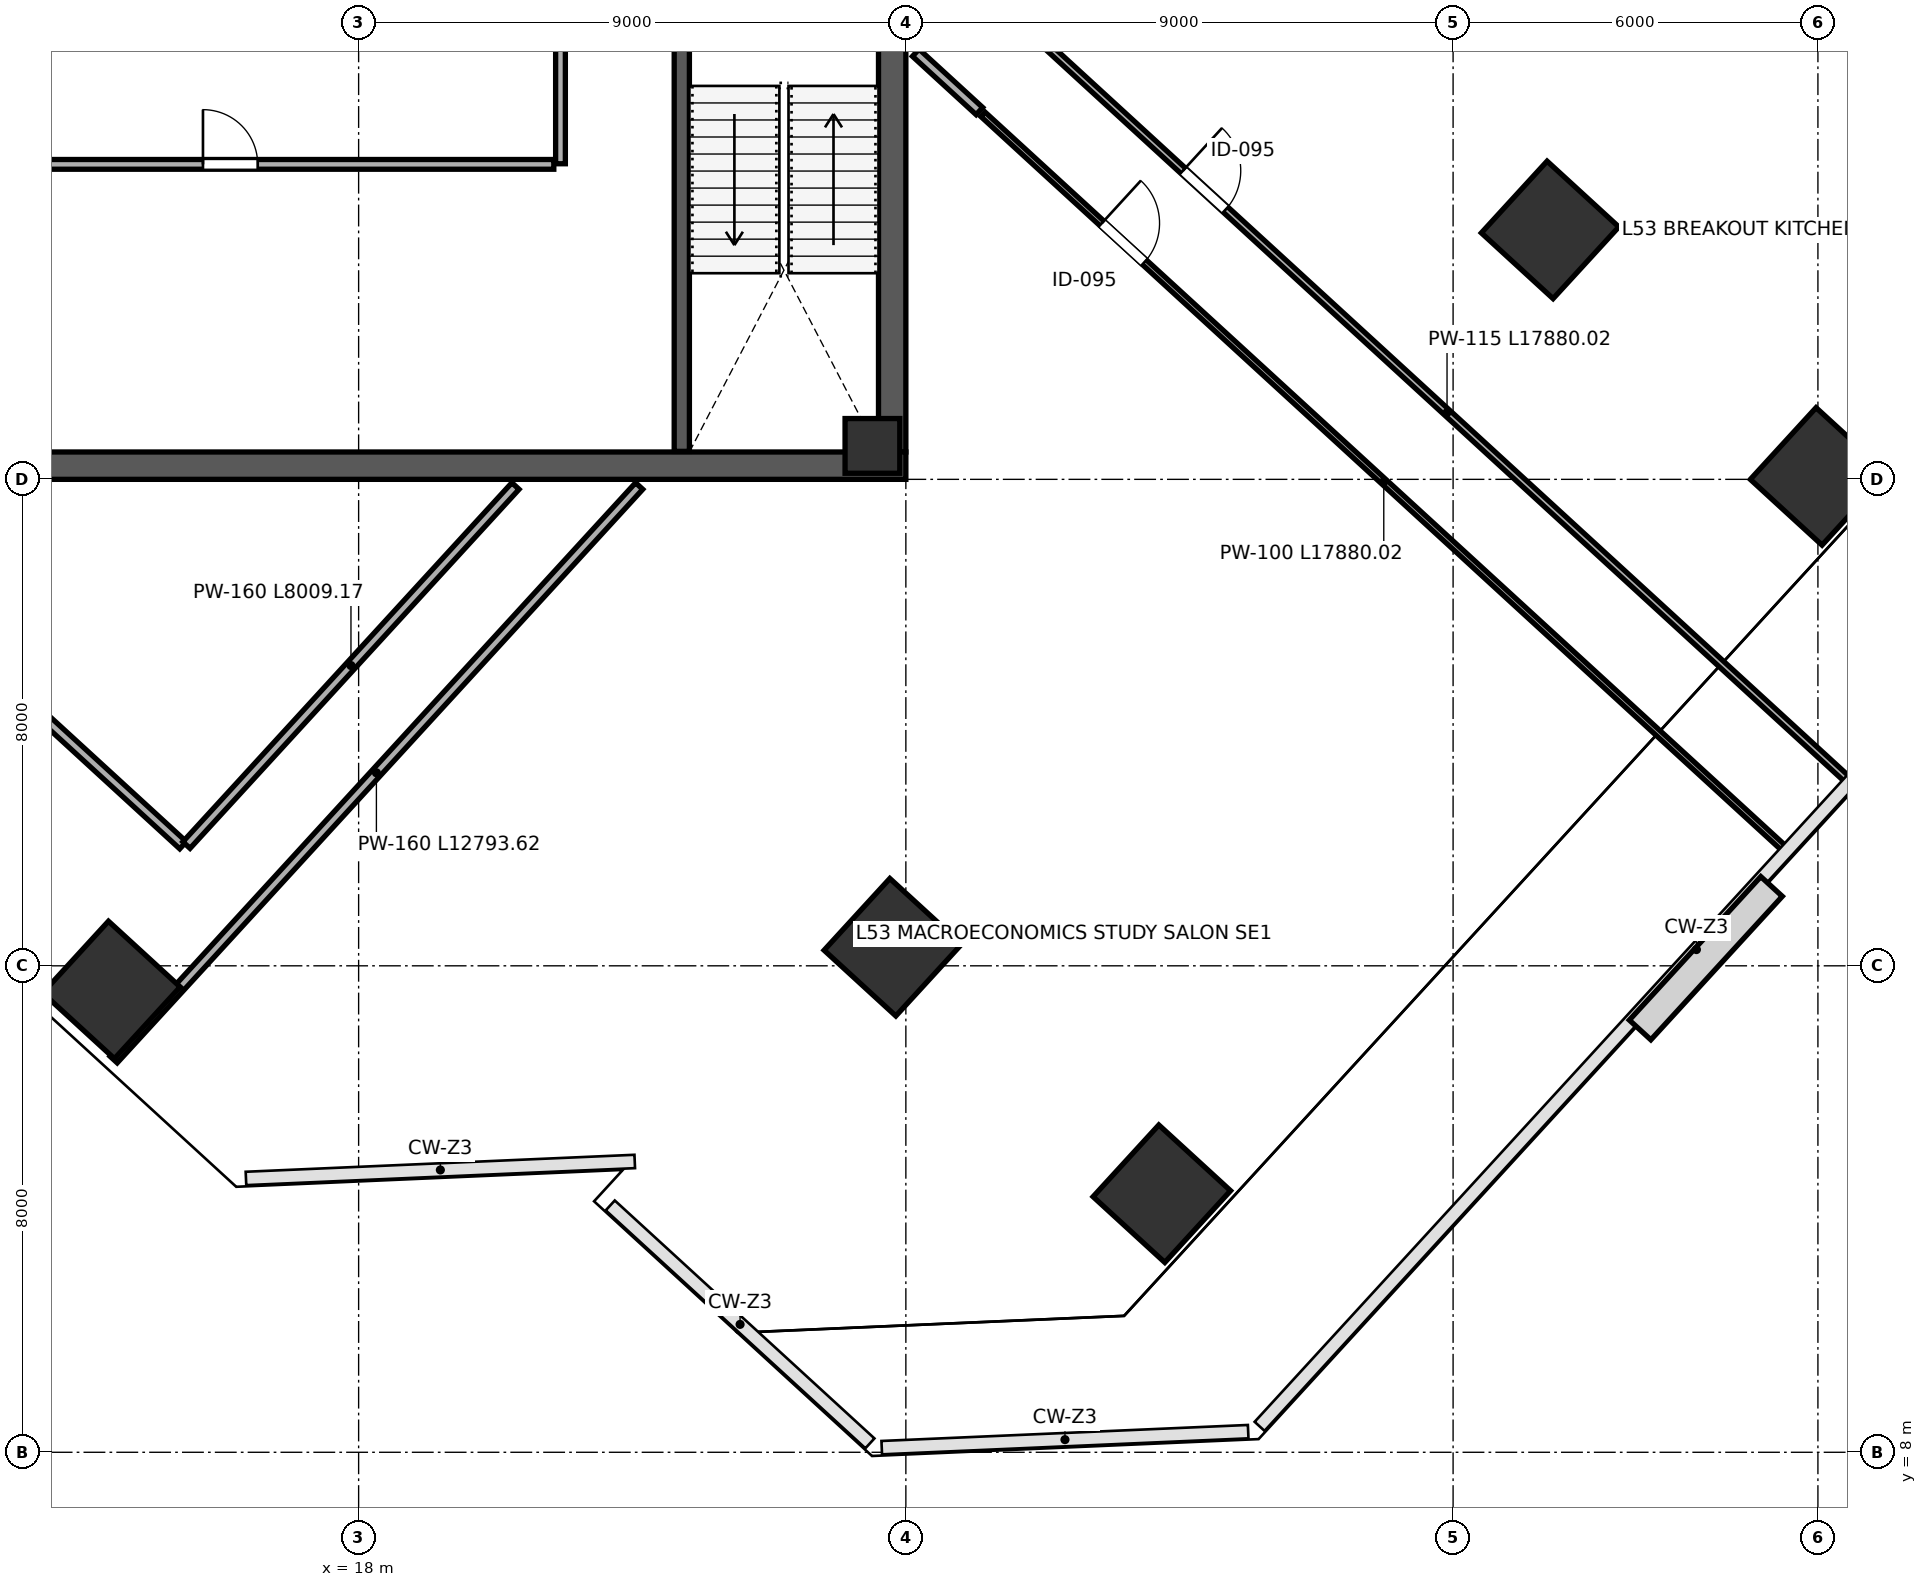
"""IFC4 building model, lengths in metres.
Left out: names, types, materials, properties, quantities, classifications, styles, units other than length and angle.
Written with IfcOpenShell. Run it as: python <this file> out.ifc"""

import sys

from ifc_helpers import new_model, si_unit, direction, frame, frame_2d, origin, origin_2d, place, context, subcontext, project, spatial, rectangle, extrude, source, transform, mapped, element, fill, save


model = new_model("IFC4")
c1 = context("Model", 3, precision=1e-05, world=origin(), true_north=direction((0.0, 1.0)))
c2 = subcontext(c1, "Body", "Model", "MODEL_VIEW")
j1 = project(units=[si_unit("LENGTHUNIT", "METRE"), si_unit("PLANEANGLEUNIT", "RADIAN")], contexts=[c1])
p1 = place(None, origin())
s1 = spatial("IfcSite", under=j1, at=p1, CompositionType="ELEMENT")
p2 = place(p1, origin())
s2 = spatial("IfcBuilding", under=s1, at=p2, CompositionType="ELEMENT")
p3 = place(p2, frame((0.0, 0.0, 237.4)))
s3 = spatial("IfcBuildingStorey", under=s2, at=p3, CompositionType="ELEMENT", Elevation=237.4)
m1 = source(origin(), c2, "Body", "SweptSolid", [
    extrude(rectangle(XDim=0.9, YDim=0.9, at=origin_2d()), origin(), (0.0, 0.0, 1.0), 4.199),
])
p4 = place(p3, frame((26.45, 24.55, 0.001), z_axis=(0.0, 0.0, 1.0), x_axis=(1.0, 0.0, 0.0)))
e1 = element("IfcColumn", 1, at=p4, inside=s3, PredefinedType="COLUMN", context=c2, shape_type="MappedRepresentation", body=[
    mapped(m1, transform((0.0, 0.0, 0.0), scale=1.0)),
])
m2 = source(origin(), c2, "Body", "SweptSolid", [
    extrude(rectangle(XDim=1.6, YDim=1.6, at=origin_2d()), origin(), (0.0, 0.0, 1.0), 4.199),
])
p5 = place(p3, frame((13.935, 15.603, 0.001), z_axis=(0.0, 0.0, 1.0), x_axis=(-0.73727733681, 0.675590207616, 0.0)))
e2 = element("IfcColumn", 2, at=p5, inside=s3, PredefinedType="COLUMN", context=c2, shape_type="MappedRepresentation", body=[
    mapped(m2, transform((0.0, 0.0, 0.0), scale=1.0)),
])
m3 = source(origin(), c2, "Body", "SweptSolid", [
    extrude(rectangle(XDim=1.6, YDim=1.6, at=origin_2d()), origin(), (0.0, 0.0, 1.0), 4.199),
])
for number, where, z_axis, x_axis in (
    (3, (26.786, 16.306, 0.001), (0.0, 0.0, 1.0), (-0.737, 0.676, 0.0)),
    (4, (37.595, 28.102, 0.001), (0.0, 0.0, 1.0), (-0.737, 0.676, 0.0)),
):
    element("IfcColumn", number, at=place(p3, frame(where, z_axis=z_axis, x_axis=x_axis)), inside=s3, PredefinedType="COLUMN", context=c2, shape_type="MappedRepresentation", body=[
        mapped(m3, transform((0.0, 0.0, 0.0), scale=1.0)),
    ])
for number, where, z_axis, x_axis in (
    (5, (31.209, 12.252, 0.001), (0.0, 0.0, 1.0), (-0.737, 0.676, 0.0)),
    (6, (42.019, 24.049, 0.001), (0.0, 0.0, 1.0), (-0.737, 0.676, 0.0)),
):
    element("IfcColumn", number, at=place(p3, frame(where, z_axis=z_axis, x_axis=x_axis)), inside=s3, PredefinedType="COLUMN", context=c2, shape_type="MappedRepresentation", body=[
        mapped(m2, transform((0.0, 0.0, 0.0), scale=1.0)),
    ])
p6 = place(p3, frame((26.775, 24.45, 0.0), z_axis=(0.0, 0.0, 1.0), x_axis=(0.0, 1.0, 0.0)))
e7 = element("IfcWall", 7, at=p6, inside=s3, PredefinedType="SHEAR", context=c2, shape_type="SweptSolid", body=[
    extrude(rectangle(XDim=15.1, YDim=0.45, at=frame_2d((7.55, 0.0))), origin(), (0.0, 0.0, 1.0), 3.96),
])
p7 = place(p6, frame((8.6, 0.0, 0.0)))
e8 = element("IfcOpeningElement", 8, at=p7, cuts=e7, PredefinedType="OPENING", context=c2, shape_type="SweptSolid", body=[
    extrude(rectangle(XDim=1.15, YDim=2.2, at=frame_2d((0.575, 1.1))), frame((0.0, 0.235, 0.0), z_axis=(0.0, -1.0, 0.0), x_axis=(1.0, 0.0, 0.0)), (0.0, 0.0, 1.0), 0.47),
])
p8 = place(p3, frame((9.0, 24.225, 0.0), z_axis=(0.0, 0.0, 1.0), x_axis=(1.0, 0.0, 0.0)))
e9 = element("IfcWall", 9, at=p8, inside=s3, PredefinedType="SHEAR", context=c2, shape_type="SweptSolid", body=[
    extrude(rectangle(XDim=18.0, YDim=0.45, at=frame_2d((9.0, 0.0))), origin(), (0.0, 0.0, 1.0), 3.96),
])
p9 = place(p3, frame((23.315, 24.46, 0.0), z_axis=(0.0, 0.0, 1.0), x_axis=(0.0, 1.0, 0.0)))
e10 = element("IfcWall", 10, at=p9, inside=s3, PredefinedType="SHEAR", context=c2, shape_type="SweptSolid", body=[
    extrude(rectangle(XDim=7.49, YDim=0.25, at=frame_2d((3.745, 0.0))), origin(), (0.0, 0.0, 1.0), 3.96),
])
p10 = place(p3, frame((12.84, 29.18, 0.0), z_axis=(0.0, 0.0, 1.0), x_axis=(1.0, 0.0, 0.0)))
e11 = element("IfcWall", 11, at=p10, inside=s3, PredefinedType="PARTITIONING", context=c2, shape_type="SweptSolid", body=[
    extrude(rectangle(XDim=8.37, YDim=0.16, at=frame_2d((4.185, 0.0))), origin(), (0.0, 0.0, 1.0), 3.96),
])
p11 = place(p10, frame((2.6, 0.0, 0.0)))
e12 = element("IfcOpeningElement", 12, at=p11, cuts=e11, PredefinedType="OPENING", context=c2, shape_type="SweptSolid", body=[
    extrude(rectangle(XDim=0.9, YDim=2.15, at=frame_2d((0.45, 1.075))), frame((0.0, 0.09, 0.0), z_axis=(0.0, -1.0, 0.0), x_axis=(1.0, 0.0, 0.0)), (0.0, 0.0, 1.0), 0.18),
])
p12 = place(p3, frame((21.32, 29.19, 0.0), z_axis=(0.0, 0.0, 1.0), x_axis=(0.0, 1.0, 0.0)))
e13 = element("IfcWall", 13, at=p12, inside=s3, PredefinedType="PARTITIONING", context=c2, shape_type="SweptSolid", body=[
    extrude(rectangle(XDim=2.92, YDim=0.16, at=frame_2d((1.46, 0.0))), origin(), (0.0, 0.0, 1.0), 3.96),
])
p13 = place(p3, frame((4.739, 27.489, 0.0), z_axis=(0.0, 0.0, 1.0), x_axis=(0.737276572642, -0.675591041558, 0.0)))
e14 = element("IfcWall", 14, at=p13, inside=s3, PredefinedType="PARTITIONING", context=c2, shape_type="SweptSolid", body=[
    extrude(rectangle(XDim=14.07, YDim=0.16, at=frame_2d((7.035, 0.0))), origin(), (0.0, 0.0, 1.0), 3.96),
])
p14 = place(p13, frame((1.15, 0.0, 0.0)))
e15 = element("IfcOpeningElement", 15, at=p14, cuts=e14, PredefinedType="OPENING", context=c2, shape_type="SweptSolid", body=[
    extrude(rectangle(XDim=0.95, YDim=2.15, at=frame_2d((0.475, 1.075))), frame((0.0, 0.09, 0.0), z_axis=(0.0, -1.0, 0.0), x_axis=(1.0, 0.0, 0.0)), (0.0, 0.0, 1.0), 0.18),
])
p15 = place(p3, frame((15.168, 17.986, 0.0), z_axis=(0.0, 0.0, 1.0), x_axis=(0.675616954369, 0.737252827034, 0.0)))
e16 = element("IfcWall", 16, at=p15, inside=s3, PredefinedType="PARTITIONING", context=c2, shape_type="SweptSolid", body=[
    extrude(rectangle(XDim=8.009, YDim=0.16, at=frame_2d((4.005, 0.0))), origin(), (0.0, 0.0, 1.0), 3.96),
])
p16 = place(p3, frame((27.163, 31.016, 0.0), z_axis=(0.0, 0.0, 1.0), x_axis=(0.737296869908, -0.675568890361, 0.0)))
e17 = element("IfcWall", 17, at=p16, inside=s3, PredefinedType="PARTITIONING", context=c2, shape_type="SweptSolid", body=[
    extrude(rectangle(XDim=1.42, YDim=0.16, at=frame_2d((0.71, 0.0))), origin(), (0.0, 0.0, 1.0), 3.96),
])
p17 = place(p3, frame((13.971, 14.458, 0.0), z_axis=(0.0, 0.0, 1.0), x_axis=(0.675595861889, 0.737272155583, 0.0)))
e18 = element("IfcWall", 18, at=p17, inside=s3, PredefinedType="PARTITIONING", context=c2, shape_type="SweptSolid", body=[
    extrude(rectangle(XDim=12.794, YDim=0.16, at=frame_2d((6.397, 0.0))), origin(), (0.0, 0.0, 1.0), 3.96),
])
p18 = place(p3, frame((29.309, 31.138, 0.0), z_axis=(0.0, 0.0, 1.0), x_axis=(0.737278819957, -0.675588589041, 0.0)))
e19 = element("IfcWall", 19, at=p18, inside=s3, PredefinedType="PARTITIONING", context=c2, shape_type="SweptSolid", body=[
    extrude(rectangle(XDim=17.88, YDim=0.115, at=frame_2d((8.94, 0.0))), origin(), (0.0, 0.0, 1.0), 3.96),
])
p19 = place(p18, frame((3.05, 0.0, 0.0)))
e20 = element("IfcOpeningElement", 20, at=p19, cuts=e19, PredefinedType="OPENING", context=c2, shape_type="SweptSolid", body=[
    extrude(rectangle(XDim=0.95, YDim=2.15, at=frame_2d((0.475, 1.075))), frame((0.0, 0.067, 0.0), z_axis=(0.0, -1.0, 0.0), x_axis=(1.0, 0.0, 0.0)), (0.0, 0.0, 1.0), 0.135),
])
p20 = place(p3, frame((28.269, 30.002, 0.0), z_axis=(0.0, 0.0, 1.0), x_axis=(0.737272587758, -0.67559539026, 0.0)))
e21 = element("IfcWall", 21, at=p20, inside=s3, PredefinedType="PARTITIONING", context=c2, shape_type="SweptSolid", body=[
    extrude(rectangle(XDim=17.88, YDim=0.1, at=frame_2d((8.94, 0.0))), origin(), (0.0, 0.0, 1.0), 3.96),
])
p21 = place(p20, frame((2.65, 0.0, 0.0)))
e22 = element("IfcOpeningElement", 22, at=p21, cuts=e21, PredefinedType="OPENING", context=c2, shape_type="SweptSolid", body=[
    extrude(rectangle(XDim=0.95, YDim=2.15, at=frame_2d((0.475, 1.075))), frame((0.0, 0.06, 0.0), z_axis=(0.0, -1.0, 0.0), x_axis=(1.0, 0.0, 0.0)), (0.0, 0.0, 1.0), 0.12),
])
m4 = source(origin(), c2, "Body", "SweptSolid", [
    extrude(rectangle(XDim=0.9, YDim=2.15, at=frame_2d((0.45, 1.075))), frame((0.0, 0.025, 0.0), z_axis=(0.0, -1.0, 0.0), x_axis=(1.0, 0.0, 0.0)), (0.0, 0.0, 1.0), 0.05),
])
p22 = place(p11, origin())
e23 = element("IfcDoor", 23, at=p22, inside=s3, OperationType="SINGLE_SWING_LEFT", PredefinedType="DOOR", context=c2, shape_type="MappedRepresentation", body=[
    mapped(m4, transform((0.0, 0.0, 0.0), scale=1.0)),
])
fill(e12, e23)
m5 = source(origin(), c2, "Body", "SweptSolid", [
    extrude(rectangle(XDim=0.95, YDim=2.15, at=frame_2d((0.475, 1.075))), frame((0.0, 0.025, 0.0), z_axis=(0.0, -1.0, 0.0), x_axis=(1.0, 0.0, 0.0)), (0.0, 0.0, 1.0), 0.05),
])
p23 = place(p19, origin())
e24 = element("IfcDoor", 24, at=p23, inside=s3, OperationType="SINGLE_SWING_LEFT", PredefinedType="DOOR", context=c2, shape_type="MappedRepresentation", body=[
    mapped(m5, transform((0.0, 0.0, 0.0), scale=1.0)),
])
fill(e20, e24)
p24 = place(p21, origin())
e25 = element("IfcDoor", 25, at=p24, inside=s3, OperationType="SINGLE_SWING_LEFT", PredefinedType="DOOR", context=c2, shape_type="MappedRepresentation", body=[
    mapped(m5, transform((0.0, 0.0, 0.0), scale=1.0)),
])
fill(e22, e25)
save(model, sys.argv[1])
